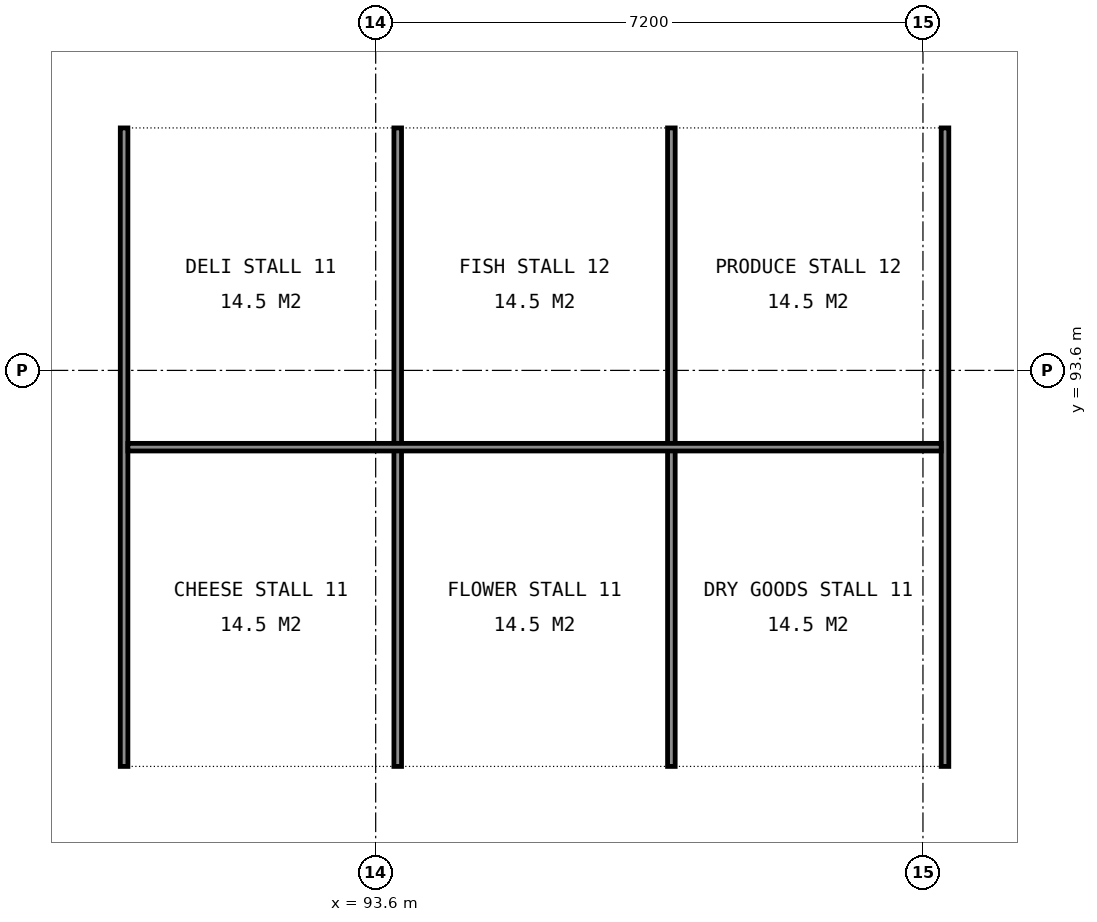
"""IFC4 building model, lengths in metres.
Left out: names, types, materials, properties, quantities, classifications, styles, units other than length and angle.
Written with IfcOpenShell. Run it as: python <this file> out.ifc"""

import sys

from ifc_helpers import new_model, si_unit, direction, frame, frame_2d, origin, place, context, subcontext, project, spatial, rectangle, extrude, element, save


model = new_model("IFC4")
c1 = context("Model", 3, precision=1e-05, world=origin(), true_north=direction((0.0, 1.0)))
c2 = subcontext(c1, "Body", "Model", "MODEL_VIEW")
j1 = project(units=[si_unit("LENGTHUNIT", "METRE"), si_unit("PLANEANGLEUNIT", "RADIAN")], contexts=[c1])
p1 = place(None, origin())
s1 = spatial("IfcSite", under=j1, at=p1, CompositionType="ELEMENT")
p2 = place(p1, origin())
s2 = spatial("IfcBuilding", under=s1, at=p2, CompositionType="ELEMENT")
p3 = place(p2, origin())
s3 = spatial("IfcBuildingStorey", under=s2, at=p3, CompositionType="ELEMENT", Elevation=0.0)
for number, where, z_axis, x_axis in (
    (1, (90.29, 88.39, 0.0), (0.0, 0.0, 1.0), (0.0, 1.0, 0.0)),
    (2, (93.89, 88.39, 0.0), (0.0, 0.0, 1.0), (0.0, 1.0, 0.0)),
    (3, (97.49, 88.39, 0.0), (0.0, 0.0, 1.0), (0.0, 1.0, 0.0)),
    (4, (101.09, 88.39, 0.0), (0.0, 0.0, 1.0), (0.0, 1.0, 0.0)),
):
    element("IfcWall", number, at=place(p3, frame(where, z_axis=z_axis, x_axis=x_axis)), inside=s3, PredefinedType="PARTITIONING", context=c2, shape_type="SweptSolid", body=[
        extrude(rectangle(XDim=8.4, YDim=0.1, at=frame_2d((4.2, 0.0))), origin(), (0.0, 0.0, 1.0), 1.2),
    ])
p4 = place(p3, frame((90.34, 92.59, 0.0), z_axis=(0.0, 0.0, 1.0), x_axis=(1.0, 0.0, 0.0)))
e5 = element("IfcWall", 5, at=p4, inside=s3, PredefinedType="PARTITIONING", context=c2, shape_type="SweptSolid", body=[
    extrude(rectangle(XDim=10.7, YDim=0.1, at=frame_2d((5.35, 0.0))), origin(), (0.0, 0.0, 1.0), 1.2),
])
save(model, sys.argv[1])
